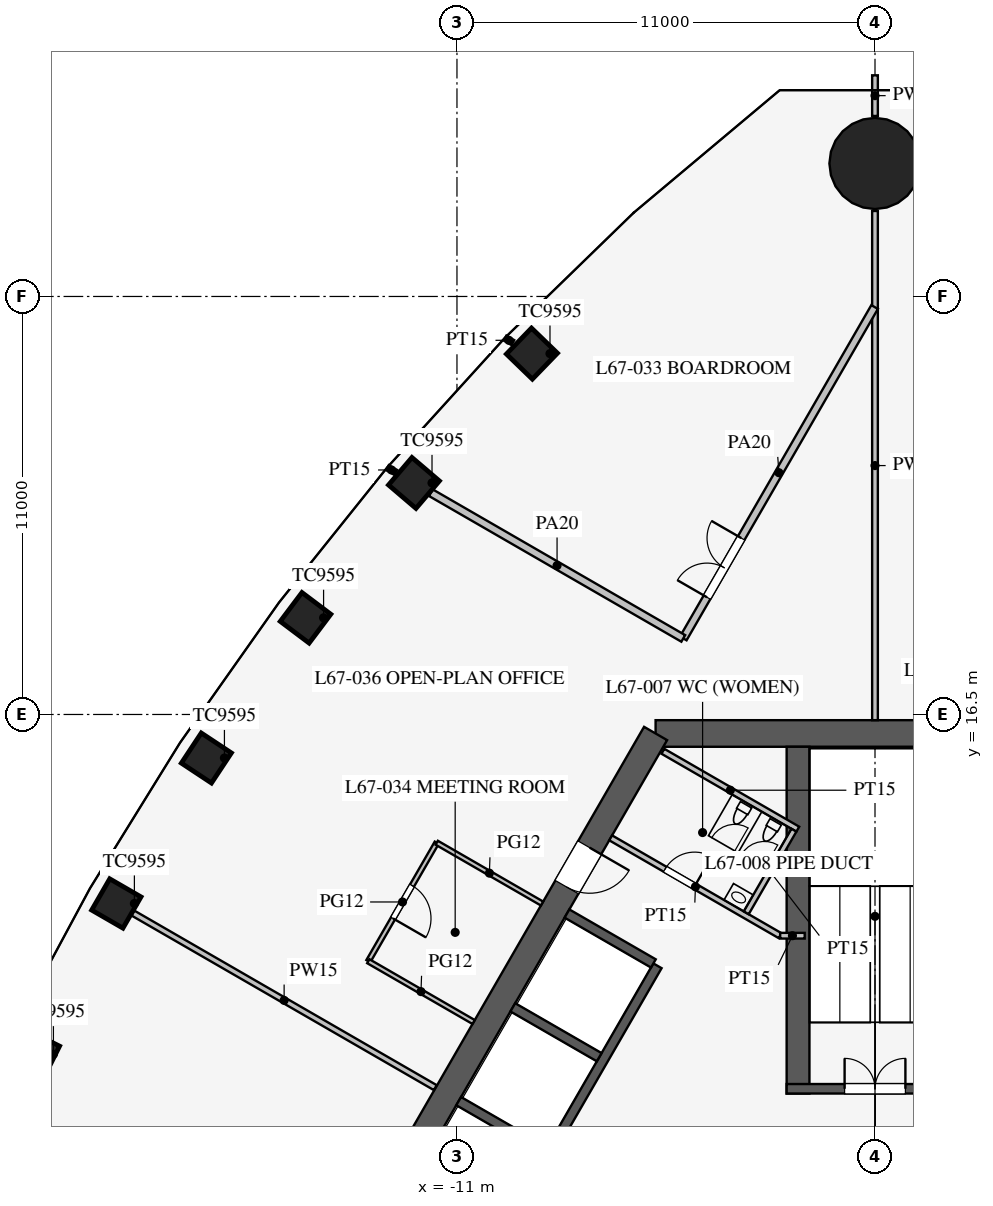
"""IFC4 building model, lengths in metres.
Left out: names, types, materials, properties, quantities, classifications, styles, units other than length and angle.
Written with IfcOpenShell. Run it as: python <this file> out.ifc"""

import sys

from ifc_helpers import new_model, si_unit, direction, frame, frame_2d, origin, origin_2d, place, context, subcontext, project, spatial, rectangle, circle, extrude, element, fill, save


model = new_model("IFC4")
c1 = context("Model", 3, precision=1e-05, world=origin(), true_north=direction((0.0, 1.0)))
c2 = subcontext(c1, "Body", "Model", "MODEL_VIEW")
j1 = project(units=[si_unit("LENGTHUNIT", "METRE"), si_unit("PLANEANGLEUNIT", "RADIAN")], contexts=[c1])
p1 = place(None, origin())
s1 = spatial("IfcSite", under=j1, at=p1, CompositionType="ELEMENT")
p2 = place(p1, origin())
s2 = spatial("IfcBuilding", under=s1, at=p2, CompositionType="ELEMENT")
p3 = place(p2, frame((0.0, 0.0, 293.1)))
s3 = spatial("IfcBuildingStorey", under=s2, at=p3, CompositionType="ELEMENT", Elevation=293.1)
for number, where, z_axis, x_axis in (
    (1, (-9.027, 25.997, 0.0), (0.0, 0.0, 1.0), (-0.695, -0.719, 0.0)),
    (2, (-12.132, 22.593, 0.0), (0.0, 0.0, 1.0), (-0.649, -0.761, 0.0)),
    (3, (-14.985, 19.044, 0.0), (0.0, 0.0, 1.0), (-0.601, -0.799, 0.0)),
    (4, (-17.594, 15.354, 0.0), (0.0, 0.0, 1.0), (-0.552, -0.834, 0.0)),
    (5, (-19.963, 11.526, 0.0), (0.0, 0.0, 1.0), (-0.5, -0.866, 0.0)),
    (6, (-22.094, 7.56, 0.0), (0.0, 0.0, 1.0), (-0.447, -0.895, 0.0)),
):
    element("IfcColumn", number, at=place(p3, frame(where, z_axis=z_axis, x_axis=x_axis)), inside=s3, PredefinedType="COLUMN", context=c2, shape_type="SweptSolid", body=[
        extrude(rectangle(XDim=0.95, YDim=0.95, at=origin_2d()), origin(), (0.0, 0.0, 1.0), 4.2),
    ])
p4 = place(p3, frame((0.0, 31.0, 0.0), z_axis=(0.0, 0.0, 1.0), x_axis=(1.0, 0.0, 0.0)))
e7 = element("IfcColumn", 7, at=p4, inside=s3, PredefinedType="COLUMN", context=c2, shape_type="SweptSolid", body=[
    extrude(circle(Radius=1.2, at=origin_2d()), origin(), (0.0, 0.0, 1.0), 4.2),
])
p5 = place(p3, frame((5.773, 16.0, 0.0), z_axis=(0.0, 0.0, 1.0), x_axis=(-1.0, 0.0, 0.0)))
e8 = element("IfcWall", 8, at=p5, inside=s3, PredefinedType="SHEAR", context=c2, shape_type="SweptSolid", body=[
    extrude(rectangle(XDim=11.547, YDim=0.7, at=frame_2d((5.773, 0.0))), origin(), (0.0, 0.0, 1.0), 4.2),
])
p6 = place(p3, frame((-5.773, 16.0, 0.0), z_axis=(0.0, 0.0, 1.0), x_axis=(-0.500002442456, -0.866023993627, 0.0)))
e9 = element("IfcWall", 9, at=p6, inside=s3, PredefinedType="SHEAR", context=c2, shape_type="SweptSolid", body=[
    extrude(rectangle(XDim=21.939, YDim=0.7, at=frame_2d((10.97, 0.0))), origin(), (0.0, 0.0, 1.0), 4.2),
])
p7 = place(p6, frame((17.27, 0.0, 0.0)))
e10 = element("IfcOpeningElement", 10, at=p7, cuts=e9, PredefinedType="OPENING", context=c2, shape_type="SweptSolid", body=[
    extrude(rectangle(XDim=1.2, YDim=2.1, at=frame_2d((0.6, 1.05))), frame((0.0, 0.36, 0.0), z_axis=(0.0, -1.0, 0.0), x_axis=(1.0, 0.0, 0.0)), (0.0, 0.0, 1.0), 0.72),
])
p8 = place(p6, frame((3.47, 0.0, 0.0)))
e11 = element("IfcOpeningElement", 11, at=p8, cuts=e9, PredefinedType="OPENING", context=c2, shape_type="SweptSolid", body=[
    extrude(rectangle(XDim=1.2, YDim=2.1, at=frame_2d((0.6, 1.05))), frame((0.0, 0.36, 0.0), z_axis=(0.0, -1.0, 0.0), x_axis=(1.0, 0.0, 0.0)), (0.0, 0.0, 1.0), 0.72),
])
p9 = place(p3, frame((-5.724, 9.886, 0.0), z_axis=(0.0, 0.0, 1.0), x_axis=(-0.500001763848, -0.866024385424, 0.0)))
e12 = element("IfcWall", 12, at=p9, inside=s3, PredefinedType="SHEAR", context=c2, shape_type="SweptSolid", body=[
    extrude(rectangle(XDim=11.4, YDim=0.25, at=frame_2d((5.7, 0.0))), origin(), (0.0, 0.0, 1.0), 4.2),
])
p10 = place(p9, frame((6.525, 0.0, 0.0)))
e13 = element("IfcOpeningElement", 13, at=p10, cuts=e12, PredefinedType="OPENING", context=c2, shape_type="SweptSolid", body=[
    extrude(rectangle(XDim=1.2, YDim=2.2, at=frame_2d((0.6, 1.1))), frame((0.0, 0.135, 0.0), z_axis=(0.0, -1.0, 0.0), x_axis=(1.0, 0.0, 0.0)), (0.0, 0.0, 1.0), 0.27),
])
p11 = place(p9, frame((9.375, 0.0, 0.0)))
e14 = element("IfcOpeningElement", 14, at=p11, cuts=e12, PredefinedType="OPENING", context=c2, shape_type="SweptSolid", body=[
    extrude(rectangle(XDim=1.2, YDim=2.2, at=frame_2d((0.6, 1.1))), frame((0.0, 0.135, 0.0), z_axis=(0.0, -1.0, 0.0), x_axis=(1.0, 0.0, 0.0)), (0.0, 0.0, 1.0), 0.27),
])
for number, where, z_axis, x_axis in (
    (15, (-5.832, 9.949, 0.0), (0.0, 0.0, 1.0), (-0.866, 0.5, 0.0)),
    (16, (-7.257, 7.481, 0.0), (0.0, 0.0, 1.0), (-0.866, 0.5, 0.0)),
    (17, (-8.682, 5.012, 0.0), (0.0, 0.0, 1.0), (-0.866, 0.5, 0.0)),
):
    element("IfcWall", number, at=place(p3, frame(where, z_axis=z_axis, x_axis=x_axis)), inside=s3, PredefinedType="SHEAR", context=c2, shape_type="SweptSolid", body=[
        extrude(rectangle(XDim=2.625, YDim=0.25, at=frame_2d((1.312, 0.0))), origin(), (0.0, 0.0, 1.0), 4.2),
    ])
p12 = place(p3, frame((-2.025, 6.525, 0.0), z_axis=(0.0, 0.0, 1.0), x_axis=(0.0, 1.0, 0.0)))
e18 = element("IfcWall", 18, at=p12, inside=s3, PredefinedType="SHEAR", context=c2, shape_type="SweptSolid", body=[
    extrude(rectangle(XDim=9.125, YDim=0.6, at=frame_2d((4.562, 0.0))), origin(), (0.0, 0.0, 1.0), 4.2),
])
p13 = place(p3, frame((2.325, 6.65, 0.0), z_axis=(0.0, 0.0, 1.0), x_axis=(-1.0, 0.0, 0.0)))
e19 = element("IfcWall", 19, at=p13, inside=s3, PredefinedType="SHEAR", context=c2, shape_type="SweptSolid", body=[
    extrude(rectangle(XDim=4.65, YDim=0.25, at=frame_2d((2.325, 0.0))), origin(), (0.0, 0.0, 1.0), 4.2),
])
p14 = place(p13, frame((1.525, 0.0, 0.0)))
e20 = element("IfcOpeningElement", 20, at=p14, cuts=e19, PredefinedType="OPENING", context=c2, shape_type="SweptSolid", body=[
    extrude(rectangle(XDim=1.6, YDim=2.1, at=frame_2d((0.8, 1.05))), frame((0.0, 0.135, 0.0), z_axis=(0.0, -1.0, 0.0), x_axis=(1.0, 0.0, 0.0)), (0.0, 0.0, 1.0), 0.27),
])
p15 = place(p3, frame((-2.495, 10.678, 0.0), z_axis=(0.0, 0.0, 1.0), x_axis=(-0.866037967349, 0.499978238636, 0.0)))
e21 = element("IfcWall", 21, at=p15, inside=s3, PredefinedType="PARTITIONING", context=c2, shape_type="SweptSolid", body=[
    extrude(rectangle(XDim=5.15, YDim=0.15, at=frame_2d((2.575, 0.0))), origin(), (0.0, 0.0, 1.0), 4.0),
])
p16 = place(p15, frame((2.6, 0.0, 0.0)))
e22 = element("IfcOpeningElement", 22, at=p16, cuts=e21, PredefinedType="OPENING", context=c2, shape_type="SweptSolid", body=[
    extrude(rectangle(XDim=0.9, YDim=2.1, at=frame_2d((0.45, 1.05))), frame((0.0, 0.085, 0.0), z_axis=(0.0, -1.0, 0.0), x_axis=(1.0, 0.0, 0.0)), (0.0, 0.0, 1.0), 0.17),
])
p17 = place(p3, frame((-2.495, 10.678, 0.0), z_axis=(0.0, 0.0, 1.0), x_axis=(1.0, 0.0, 0.0)))
e23 = element("IfcWall", 23, at=p17, inside=s3, PredefinedType="PARTITIONING", context=c2, shape_type="SweptSolid", body=[
    extrude(rectangle(XDim=0.645, YDim=0.15, at=frame_2d((0.323, 0.0))), origin(), (0.0, 0.0, 1.0), 4.0),
])
p18 = place(p3, frame((-2.031, 13.482, 0.0), z_axis=(0.0, 0.0, 1.0), x_axis=(-0.866050731258, 0.499956128963, 0.0)))
e24 = element("IfcWall", 24, at=p18, inside=s3, PredefinedType="PARTITIONING", context=c2, shape_type="SweptSolid", body=[
    extrude(rectangle(XDim=4.1, YDim=0.15, at=frame_2d((2.05, 0.0))), origin(), (0.0, 0.0, 1.0), 4.0),
])
p19 = place(p3, frame((-3.389, 11.281, 0.0), z_axis=(0.0, 0.0, 1.0), x_axis=(0.499989096993, 0.866031698547, 0.0)))
e25 = element("IfcWall", 25, at=p19, inside=s3, PredefinedType="PARTITIONING", context=c2, shape_type="SweptSolid", body=[
    extrude(rectangle(XDim=2.51, YDim=0.15, at=frame_2d((1.255, 0.0))), origin(), (0.0, 0.0, 1.0), 4.0),
])
p20 = place(p3, frame((0.0, 16.35, 0.0), z_axis=(0.0, 0.0, 1.0), x_axis=(0.0, 1.0, 0.0)))
e26 = element("IfcWall", 26, at=p20, inside=s3, PredefinedType="PARTITIONING", context=c2, shape_type="SweptSolid", body=[
    extrude(rectangle(XDim=13.4, YDim=0.15, at=frame_2d((6.7, 0.0))), origin(), (0.0, 0.0, 1.0), 2.5),
])
p21 = place(p3, frame((0.0, 32.25, 0.0), z_axis=(0.0, 0.0, 1.0), x_axis=(0.0, 1.0, 0.0)))
e27 = element("IfcWall", 27, at=p21, inside=s3, PredefinedType="PARTITIONING", context=c2, shape_type="SweptSolid", body=[
    extrude(rectangle(XDim=1.07, YDim=0.15, at=frame_2d((0.535, 0.0))), origin(), (0.0, 0.0, 1.0), 2.5),
])
p22 = place(p3, frame((-5.045, 18.501, 0.0), z_axis=(0.0, 0.0, 1.0), x_axis=(0.499990381663, 0.866030956863, 0.0)))
e28 = element("IfcWall", 28, at=p22, inside=s3, PredefinedType="PARTITIONING", context=c2, shape_type="SweptSolid", body=[
    extrude(rectangle(XDim=10.07, YDim=0.2, at=frame_2d((5.035, 0.0))), origin(), (0.0, 0.0, 1.0), 2.9),
])
p23 = place(p22, frame((1.25, 0.0, 0.15)))
e29 = element("IfcOpeningElement", 29, at=p23, cuts=e28, PredefinedType="OPENING", context=c2, shape_type="SweptSolid", body=[
    extrude(rectangle(XDim=1.8, YDim=2.1, at=frame_2d((0.9, 1.05))), frame((0.0, 0.11, 0.0), z_axis=(0.0, -1.0, 0.0), x_axis=(1.0, 0.0, 0.0)), (0.0, 0.0, 1.0), 0.22),
])
p24 = place(p3, frame((-11.57, 6.68, 0.0), z_axis=(0.0, 0.0, 1.0), x_axis=(-0.866026706704, 0.49999774327, 0.0)))
e30 = element("IfcWall", 30, at=p24, inside=s3, PredefinedType="PARTITIONING", context=c2, shape_type="SweptSolid", body=[
    extrude(rectangle(XDim=9.187, YDim=0.15, at=frame_2d((4.593, 0.0))), origin(), (0.0, 0.0, 1.0), 3.3),
])
p25 = place(p3, frame((-11.533, 13.125, 0.0), z_axis=(0.0, 0.0, 1.0), x_axis=(-0.500012057535, -0.866018442252, 0.0)))
e31 = element("IfcWall", 31, at=p25, inside=s3, PredefinedType="PARTITIONING", context=c2, shape_type="SweptSolid", body=[
    extrude(rectangle(XDim=3.6, YDim=0.12, at=frame_2d((1.8, 0.0))), origin(), (0.0, 0.0, 1.0), 2.9),
])
p26 = place(p25, frame((1.3, 0.0, 0.15)))
e32 = element("IfcOpeningElement", 32, at=p26, cuts=e31, PredefinedType="OPENING", context=c2, shape_type="SweptSolid", body=[
    extrude(rectangle(XDim=1.0, YDim=2.1, at=frame_2d((0.5, 1.05))), frame((0.0, 0.07, 0.0), z_axis=(0.0, -1.0, 0.0), x_axis=(1.0, 0.0, 0.0)), (0.0, 0.0, 1.0), 0.14),
])
for number, where, z_axis, x_axis in (
    (33, (-10.562, 8.407, 0.0), (0.0, 0.0, 1.0), (-0.866, 0.5, 0.0)),
    (34, (-8.761, 11.525, 0.0), (0.0, 0.0, 1.0), (-0.866, 0.5, 0.0)),
):
    element("IfcWall", number, at=place(p3, frame(where, z_axis=z_axis, x_axis=x_axis)), inside=s3, PredefinedType="PARTITIONING", context=c2, shape_type="SweptSolid", body=[
        extrude(rectangle(XDim=3.2, YDim=0.12, at=frame_2d((1.6, 0.0))), origin(), (0.0, 0.0, 1.0), 2.9),
    ])
p27 = place(p3, frame((-12.615, 22.872, 0.0), z_axis=(0.0, 0.0, 1.0), x_axis=(-0.866201770413, 0.499694399542, 0.0)))
e35 = element("IfcWall", 35, at=p27, inside=s3, PredefinedType="PARTITIONING", context=c2, shape_type="SweptSolid", body=[
    extrude(rectangle(XDim=0.251, YDim=0.15, at=frame_2d((0.125, 0.0))), origin(), (0.0, 0.0, 1.0), 2.9),
])
p28 = place(p3, frame((-9.53, 26.287, 0.0), z_axis=(0.0, 0.0, 1.0), x_axis=(-0.866100656052, 0.499869636591, 0.0)))
e36 = element("IfcWall", 36, at=p28, inside=s3, PredefinedType="PARTITIONING", context=c2, shape_type="SweptSolid", body=[
    extrude(rectangle(XDim=0.239, YDim=0.15, at=frame_2d((0.12, 0.0))), origin(), (0.0, 0.0, 1.0), 2.9),
])
p29 = place(p3, frame((-5.045, 18.501, 0.0), z_axis=(0.0, 0.0, 1.0), x_axis=(-0.866036625086, 0.499980563632, 0.0)))
e37 = element("IfcWall", 37, at=p29, inside=s3, PredefinedType="PARTITIONING", context=c2, shape_type="SweptSolid", body=[
    extrude(rectangle(XDim=7.669, YDim=0.2, at=frame_2d((3.834, 0.0))), origin(), (0.0, 0.0, 1.0), 2.9),
])
p30 = place(p16, frame((0.9, 0.0, 0.0), z_axis=(0.0, 0.0, 1.0), x_axis=(-1.0, 0.0, 0.0)))
e38 = element("IfcDoor", 38, at=p30, inside=s3, OperationType="SINGLE_SWING_RIGHT", PredefinedType="DOOR", context=c2, shape_type="SweptSolid", body=[
    extrude(rectangle(XDim=0.9, YDim=2.1, at=frame_2d((0.45, 1.05))), frame((0.0, 0.025, 0.0), z_axis=(0.0, -1.0, 0.0), x_axis=(1.0, 0.0, 0.0)), (0.0, 0.0, 1.0), 0.05),
])
fill(e22, e38)
p31 = place(p14, frame((1.6, 0.0, 0.0), z_axis=(0.0, 0.0, 1.0), x_axis=(-1.0, 0.0, 0.0)))
e39 = element("IfcDoor", 39, at=p31, inside=s3, OperationType="DOUBLE_DOOR_SINGLE_SWING", PredefinedType="DOOR", context=c2, shape_type="SweptSolid", body=[
    extrude(rectangle(XDim=1.6, YDim=2.1, at=frame_2d((0.8, 1.05))), frame((0.0, 0.025, 0.0), z_axis=(0.0, -1.0, 0.0), x_axis=(1.0, 0.0, 0.0)), (0.0, 0.0, 1.0), 0.05),
])
fill(e20, e39)
p32 = place(p8, origin())
e40 = element("IfcDoor", 40, at=p32, inside=s3, OperationType="SINGLE_SWING_LEFT", PredefinedType="DOOR", context=c2, shape_type="SweptSolid", body=[
    extrude(rectangle(XDim=1.2, YDim=2.1, at=frame_2d((0.6, 1.05))), frame((0.0, 0.025, 0.0), z_axis=(0.0, -1.0, 0.0), x_axis=(1.0, 0.0, 0.0)), (0.0, 0.0, 1.0), 0.05),
])
fill(e11, e40)
p33 = place(p23, origin())
e41 = element("IfcDoor", 41, at=p33, inside=s3, OperationType="DOUBLE_DOOR_SINGLE_SWING", PredefinedType="DOOR", context=c2, shape_type="SweptSolid", body=[
    extrude(rectangle(XDim=1.8, YDim=2.1, at=frame_2d((0.9, 1.05))), frame((0.0, 0.025, 0.0), z_axis=(0.0, -1.0, 0.0), x_axis=(1.0, 0.0, 0.0)), (0.0, 0.0, 1.0), 0.05),
])
fill(e29, e41)
p34 = place(p26, origin())
e42 = element("IfcDoor", 42, at=p34, inside=s3, OperationType="SINGLE_SWING_RIGHT", PredefinedType="DOOR", context=c2, shape_type="SweptSolid", body=[
    extrude(rectangle(XDim=1.0, YDim=2.1, at=frame_2d((0.5, 1.05))), frame((0.0, 0.025, 0.0), z_axis=(0.0, -1.0, 0.0), x_axis=(1.0, 0.0, 0.0)), (0.0, 0.0, 1.0), 0.05),
])
fill(e32, e42)
save(model, sys.argv[1])
